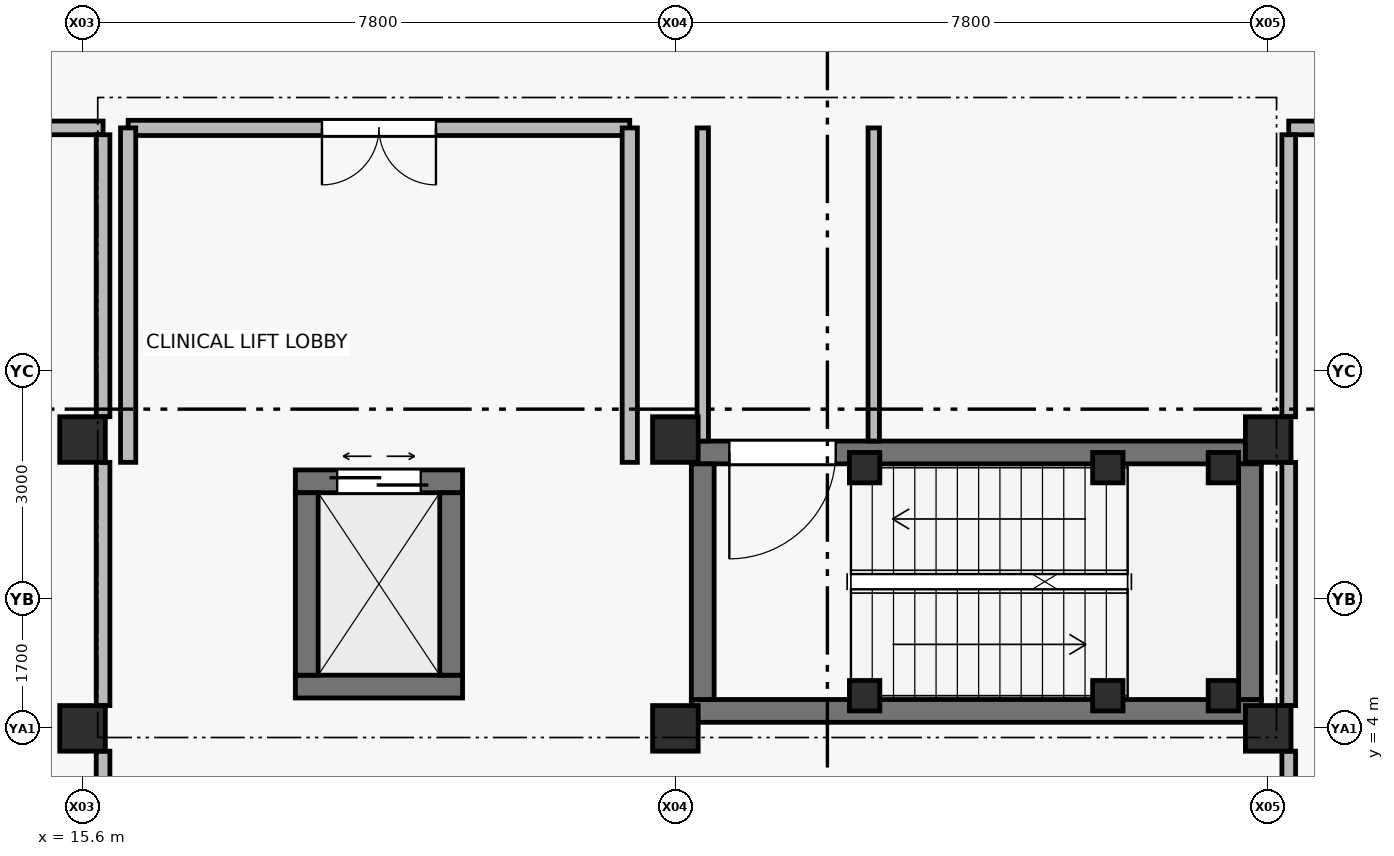
"""IFC4 building model, lengths in metres.
Left out: names, types, materials, properties, quantities, classifications, styles, units other than length and angle.
Written with IfcOpenShell. Run it as: python <this file> out.ifc"""

import sys

from ifc_helpers import new_model, si_unit, direction, frame, frame_2d, origin, origin_2d, place, context, subcontext, project, spatial, rectangle, extrude, element, fill, save


model = new_model("IFC4")
c1 = context("Model", 3, precision=1e-05, world=origin(), true_north=direction((0.0, 1.0)))
c2 = subcontext(c1, "Body", "Model", "MODEL_VIEW")
j1 = project(units=[si_unit("LENGTHUNIT", "METRE"), si_unit("PLANEANGLEUNIT", "RADIAN")], contexts=[c1])
p1 = place(None, origin())
s1 = spatial("IfcSite", under=j1, at=p1, CompositionType="ELEMENT")
p2 = place(p1, origin())
s2 = spatial("IfcBuilding", under=s1, at=p2, CompositionType="ELEMENT")
p3 = place(p2, frame((0.0, 0.0, 4.8)))
s3 = spatial("IfcBuildingStorey", under=s2, at=p3, CompositionType="ELEMENT", Elevation=4.8)
for number, where, z_axis, x_axis in (
    (1, (15.6, 4.0, 0.0), (0.0, 0.0, 1.0), (1.0, 0.0, 0.0)),
    (2, (15.6, 7.8, 0.0), (0.0, 0.0, 1.0), (1.0, 0.0, 0.0)),
    (3, (23.4, 4.0, 0.0), (0.0, 0.0, 1.0), (1.0, 0.0, 0.0)),
    (4, (23.4, 7.8, 0.0), (0.0, 0.0, 1.0), (1.0, 0.0, 0.0)),
    (5, (31.2, 4.0, 0.0), (0.0, 0.0, 1.0), (1.0, 0.0, 0.0)),
    (6, (31.2, 7.8, 0.0), (0.0, 0.0, 1.0), (1.0, 0.0, 0.0)),
):
    element("IfcColumn", number, at=place(p3, frame(where, z_axis=z_axis, x_axis=x_axis)), inside=s3, PredefinedType="COLUMN", context=c2, shape_type="SweptSolid", body=[
        extrude(rectangle(XDim=0.6, YDim=0.6, at=origin_2d()), origin(), (0.0, 0.0, 1.0), 4.8),
    ])
for number, where, z_axis, x_axis in (
    (7, (25.89, 4.43, 0.0), (0.0, 0.0, 1.0), (1.0, 0.0, 0.0)),
    (8, (25.89, 7.43, 0.0), (0.0, 0.0, 1.0), (1.0, 0.0, 0.0)),
    (9, (29.09, 4.43, 0.0), (0.0, 0.0, 1.0), (1.0, 0.0, 0.0)),
    (10, (29.09, 7.43, 0.0), (0.0, 0.0, 1.0), (1.0, 0.0, 0.0)),
    (11, (30.61, 4.43, 0.0), (0.0, 0.0, 1.0), (1.0, 0.0, 0.0)),
    (12, (30.61, 7.43, 0.0), (0.0, 0.0, 1.0), (1.0, 0.0, 0.0)),
):
    element("IfcColumn", number, at=place(p3, frame(where, z_axis=z_axis, x_axis=x_axis)), inside=s3, PredefinedType="COLUMN", context=c2, shape_type="SweptSolid", body=[
        extrude(rectangle(XDim=0.4, YDim=0.4, at=origin_2d()), origin(), (0.0, 0.0, 1.0), 4.8),
    ])
p4 = place(p3, frame((23.61, 4.23, 0.0), z_axis=(0.0, 0.0, 1.0), x_axis=(1.0, 0.0, 0.0)))
e13 = element("IfcWall", 13, at=p4, inside=s3, PredefinedType="SHEAR", context=c2, shape_type="SweptSolid", body=[
    extrude(rectangle(XDim=7.5, YDim=0.3, at=frame_2d((3.75, 0.0))), origin(), (0.0, 0.0, 1.0), 4.54),
])
p5 = place(p3, frame((31.11, 7.63, 0.0), z_axis=(0.0, 0.0, 1.0), x_axis=(-1.0, 0.0, 0.0)))
e14 = element("IfcWall", 14, at=p5, inside=s3, PredefinedType="SHEAR", context=c2, shape_type="SweptSolid", body=[
    extrude(rectangle(XDim=7.5, YDim=0.3, at=frame_2d((3.75, 0.0))), origin(), (0.0, 0.0, 1.0), 4.54),
])
p6 = place(p5, frame((5.6, 0.0, 0.0)))
e15 = element("IfcOpeningElement", 15, at=p6, cuts=e14, PredefinedType="OPENING", context=c2, shape_type="SweptSolid", body=[
    extrude(rectangle(XDim=1.4, YDim=2.2, at=frame_2d((0.7, 1.1))), frame((0.0, 0.16, 0.0), z_axis=(0.0, -1.0, 0.0), x_axis=(1.0, 0.0, 0.0)), (0.0, 0.0, 1.0), 0.32),
])
for number, where, z_axis, x_axis in (
    (16, (23.76, 7.48, 0.0), (0.0, 0.0, 1.0), (0.0, -1.0, 0.0)),
    (17, (30.96, 4.38, 0.0), (0.0, 0.0, 1.0), (0.0, 1.0, 0.0)),
):
    element("IfcWall", number, at=place(p3, frame(where, z_axis=z_axis, x_axis=x_axis)), inside=s3, PredefinedType="SHEAR", context=c2, shape_type="SweptSolid", body=[
        extrude(rectangle(XDim=3.1, YDim=0.3, at=frame_2d((1.55, 0.0))), origin(), (0.0, 0.0, 1.0), 4.54),
    ])
p7 = place(p3, frame((18.4, 4.55, 0.0), z_axis=(0.0, 0.0, 1.0), x_axis=(1.0, 0.0, 0.0)))
e18 = element("IfcWall", 18, at=p7, inside=s3, PredefinedType="SHEAR", context=c2, shape_type="SweptSolid", body=[
    extrude(rectangle(XDim=2.2, YDim=0.3, at=frame_2d((1.1, 0.0))), origin(), (0.0, 0.0, 1.0), 4.54),
])
p8 = place(p3, frame((20.6, 7.25, 0.0), z_axis=(0.0, 0.0, 1.0), x_axis=(-1.0, 0.0, 0.0)))
e19 = element("IfcWall", 19, at=p8, inside=s3, PredefinedType="SHEAR", context=c2, shape_type="SweptSolid", body=[
    extrude(rectangle(XDim=2.2, YDim=0.3, at=frame_2d((1.1, 0.0))), origin(), (0.0, 0.0, 1.0), 4.54),
])
p9 = place(p8, frame((0.55, 0.0, 0.0)))
e20 = element("IfcOpeningElement", 20, at=p9, cuts=e19, PredefinedType="OPENING", context=c2, shape_type="SweptSolid", body=[
    extrude(rectangle(XDim=1.1, YDim=2.2, at=frame_2d((0.55, 1.1))), frame((0.0, 0.16, 0.0), z_axis=(0.0, -1.0, 0.0), x_axis=(1.0, 0.0, 0.0)), (0.0, 0.0, 1.0), 0.32),
])
for number, where, z_axis, x_axis in (
    (21, (18.55, 7.1, 0.0), (0.0, 0.0, 1.0), (0.0, -1.0, 0.0)),
    (22, (20.45, 4.7, 0.0), (0.0, 0.0, 1.0), (0.0, 1.0, 0.0)),
):
    element("IfcWall", number, at=place(p3, frame(where, z_axis=z_axis, x_axis=x_axis)), inside=s3, PredefinedType="SHEAR", context=c2, shape_type="SweptSolid", body=[
        extrude(rectangle(XDim=2.4, YDim=0.3, at=frame_2d((1.2, 0.0))), origin(), (0.0, 0.0, 1.0), 4.54),
    ])
p10 = place(p3, frame((22.8, 11.9, 0.0), z_axis=(0.0, 0.0, 1.0), x_axis=(-1.0, 0.0, 0.0)))
e23 = element("IfcWall", 23, at=p10, inside=s3, PredefinedType="SOLIDWALL", context=c2, shape_type="SweptSolid", body=[
    extrude(rectangle(XDim=6.6, YDim=0.2, at=frame_2d((3.3, 0.0))), origin(), (0.0, 0.0, 1.0), 4.54),
])
p11 = place(p10, frame((2.55, 0.0, 0.0)))
e24 = element("IfcOpeningElement", 24, at=p11, cuts=e23, PredefinedType="OPENING", context=c2, shape_type="SweptSolid", body=[
    extrude(rectangle(XDim=1.5, YDim=2.2, at=frame_2d((0.75, 1.1))), frame((0.0, 0.11, 0.0), z_axis=(0.0, -1.0, 0.0), x_axis=(1.0, 0.0, 0.0)), (0.0, 0.0, 1.0), 0.22),
])
for number, where, z_axis, x_axis in (
    (25, (16.2, 11.9, 0.0), (0.0, 0.0, 1.0), (0.0, -1.0, 0.0)),
    (26, (22.8, 7.5, 0.0), (0.0, 0.0, 1.0), (0.0, 1.0, 0.0)),
):
    element("IfcWall", number, at=place(p3, frame(where, z_axis=z_axis, x_axis=x_axis)), inside=s3, PredefinedType="SOLIDWALL", context=c2, shape_type="SweptSolid", body=[
        extrude(rectangle(XDim=4.4, YDim=0.2, at=frame_2d((2.2, 0.0))), origin(), (0.0, 0.0, 1.0), 4.54),
    ])
p12 = place(p3, frame((23.76, 7.78, 0.0), z_axis=(0.0, 0.0, 1.0), x_axis=(0.0, 1.0, 0.0)))
e27 = element("IfcWall", 27, at=p12, inside=s3, PredefinedType="PARTITIONING", context=c2, shape_type="SweptSolid", body=[
    extrude(rectangle(XDim=4.12, YDim=0.15, at=frame_2d((2.06, 0.0))), origin(), (0.0, 0.0, 1.0), 4.09),
])
p13 = place(p3, frame((26.01, 7.78, 0.0), z_axis=(0.0, 0.0, 1.0), x_axis=(0.0, 1.0, 0.0)))
e28 = element("IfcWall", 28, at=p13, inside=s3, PredefinedType="PARTITIONING", context=c2, shape_type="SweptSolid", body=[
    extrude(rectangle(XDim=4.12, YDim=0.15, at=frame_2d((2.06, 0.0))), origin(), (0.0, 0.0, 1.0), 4.54),
])
p14 = place(p3, frame((15.87, 11.9, 0.0), z_axis=(0.0, 0.0, 1.0), x_axis=(-1.0, 0.0, 0.0)))
e29 = element("IfcWall", 29, at=p14, inside=s3, PredefinedType="PARTITIONING", context=c2, shape_type="SweptSolid", body=[
    extrude(rectangle(XDim=4.95, YDim=0.18, at=frame_2d((2.475, 0.0))), origin(), (0.0, 0.0, 1.0), 4.54),
])
p15 = place(p14, frame((1.615, 0.0, 0.0)))
e30 = element("IfcOpeningElement", 30, at=p15, cuts=e29, PredefinedType="OPENING", context=c2, shape_type="SweptSolid", body=[
    extrude(rectangle(XDim=1.72, YDim=2.3, at=frame_2d((0.86, 1.15))), frame((0.0, 0.1, 0.0), z_axis=(0.0, -1.0, 0.0), x_axis=(1.0, 0.0, 0.0)), (0.0, 0.0, 1.0), 0.2),
])
p16 = place(p3, frame((39.27, 11.9, 0.0), z_axis=(0.0, 0.0, 1.0), x_axis=(-1.0, 0.0, 0.0)))
e31 = element("IfcWall", 31, at=p16, inside=s3, PredefinedType="PARTITIONING", context=c2, shape_type="SweptSolid", body=[
    extrude(rectangle(XDim=7.8, YDim=0.18, at=frame_2d((3.9, 0.0))), origin(), (0.0, 0.0, 1.0), 4.54),
])
p17 = place(p16, frame((3.45, 0.0, 0.0)))
e32 = element("IfcOpeningElement", 32, at=p17, cuts=e31, PredefinedType="OPENING", context=c2, shape_type="SweptSolid", body=[
    extrude(rectangle(XDim=0.9, YDim=2.1, at=frame_2d((0.45, 1.05))), frame((0.0, 0.1, 0.0), z_axis=(0.0, -1.0, 0.0), x_axis=(1.0, 0.0, 0.0)), (0.0, 0.0, 1.0), 0.2),
])
p18 = place(p3, frame((15.87, 0.3, 0.0), z_axis=(0.0, 0.0, 1.0), x_axis=(0.0, 1.0, 0.0)))
e33 = element("IfcWall", 33, at=p18, inside=s3, PredefinedType="PARTITIONING", context=c2, shape_type="SweptSolid", body=[
    extrude(rectangle(XDim=3.4, YDim=0.18, at=frame_2d((1.7, 0.0))), origin(), (0.0, 0.0, 1.0), 4.09),
])
p19 = place(p3, frame((15.87, 4.3, 0.0), z_axis=(0.0, 0.0, 1.0), x_axis=(0.0, 1.0, 0.0)))
e34 = element("IfcWall", 34, at=p19, inside=s3, PredefinedType="PARTITIONING", context=c2, shape_type="SweptSolid", body=[
    extrude(rectangle(XDim=3.2, YDim=0.18, at=frame_2d((1.6, 0.0))), origin(), (0.0, 0.0, 1.0), 4.09),
])
p20 = place(p3, frame((15.87, 8.1, 0.0), z_axis=(0.0, 0.0, 1.0), x_axis=(0.0, 1.0, 0.0)))
e35 = element("IfcWall", 35, at=p20, inside=s3, PredefinedType="PARTITIONING", context=c2, shape_type="SweptSolid", body=[
    extrude(rectangle(XDim=3.71, YDim=0.18, at=frame_2d((1.855, 0.0))), origin(), (0.0, 0.0, 1.0), 4.09),
])
p21 = place(p3, frame((31.47, 0.3, 0.0), z_axis=(0.0, 0.0, 1.0), x_axis=(0.0, 1.0, 0.0)))
e36 = element("IfcWall", 36, at=p21, inside=s3, PredefinedType="PARTITIONING", context=c2, shape_type="SweptSolid", body=[
    extrude(rectangle(XDim=3.4, YDim=0.18, at=frame_2d((1.7, 0.0))), origin(), (0.0, 0.0, 1.0), 4.09),
])
p22 = place(p3, frame((31.47, 4.3, 0.0), z_axis=(0.0, 0.0, 1.0), x_axis=(0.0, 1.0, 0.0)))
e37 = element("IfcWall", 37, at=p22, inside=s3, PredefinedType="PARTITIONING", context=c2, shape_type="SweptSolid", body=[
    extrude(rectangle(XDim=3.2, YDim=0.18, at=frame_2d((1.6, 0.0))), origin(), (0.0, 0.0, 1.0), 4.09),
])
p23 = place(p3, frame((31.47, 8.1, 0.0), z_axis=(0.0, 0.0, 1.0), x_axis=(0.0, 1.0, 0.0)))
e38 = element("IfcWall", 38, at=p23, inside=s3, PredefinedType="PARTITIONING", context=c2, shape_type="SweptSolid", body=[
    extrude(rectangle(XDim=3.71, YDim=0.18, at=frame_2d((1.855, 0.0))), origin(), (0.0, 0.0, 1.0), 4.09),
])
p24 = place(p6, origin())
e39 = element("IfcDoor", 39, at=p24, inside=s3, OperationType="SINGLE_SWING_RIGHT", PredefinedType="DOOR", context=c2, shape_type="SweptSolid", body=[
    extrude(rectangle(XDim=1.4, YDim=2.2, at=frame_2d((0.7, 1.1))), frame((0.0, 0.025, 0.0), z_axis=(0.0, -1.0, 0.0), x_axis=(1.0, 0.0, 0.0)), (0.0, 0.0, 1.0), 0.05),
])
fill(e15, e39)
p25 = place(p9, origin())
e40 = element("IfcDoor", 40, at=p25, inside=s3, OperationType="DOUBLE_DOOR_SLIDING", PredefinedType="DOOR", context=c2, shape_type="SweptSolid", body=[
    extrude(rectangle(XDim=1.1, YDim=2.2, at=frame_2d((0.55, 1.1))), frame((0.0, 0.025, 0.0), z_axis=(0.0, -1.0, 0.0), x_axis=(1.0, 0.0, 0.0)), (0.0, 0.0, 1.0), 0.05),
])
fill(e20, e40)
p26 = place(p11, origin())
e41 = element("IfcDoor", 41, at=p26, inside=s3, OperationType="DOUBLE_DOOR_SINGLE_SWING", PredefinedType="DOOR", context=c2, shape_type="SweptSolid", body=[
    extrude(rectangle(XDim=1.5, YDim=2.2, at=frame_2d((0.75, 1.1))), frame((0.0, 0.025, 0.0), z_axis=(0.0, -1.0, 0.0), x_axis=(1.0, 0.0, 0.0)), (0.0, 0.0, 1.0), 0.05),
])
fill(e24, e41)
save(model, sys.argv[1])
